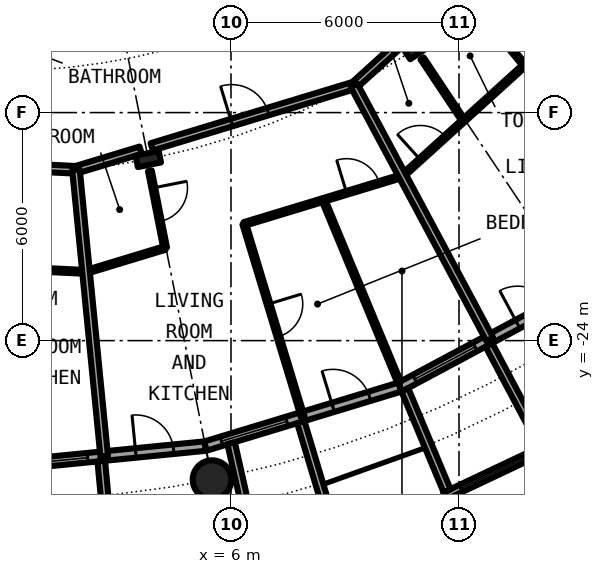
"""IFC4 building model, lengths in metres.
Left out: names, types, materials, properties, quantities, classifications, styles, units other than length and angle.
Written with IfcOpenShell. Run it as: python <this file> out.ifc"""

import sys

from ifc_helpers import new_model, si_unit, direction, frame, frame_2d, origin, origin_2d, place, context, subcontext, project, spatial, rectangle, circle, hollow_circle, i_section, extrude, element, fill, save


model = new_model("IFC4")
c1 = context("Model", 3, precision=1e-05, world=origin(), true_north=direction((0.0, 1.0)))
c2 = subcontext(c1, "Body", "Model", "MODEL_VIEW")
j1 = project(units=[si_unit("LENGTHUNIT", "METRE"), si_unit("PLANEANGLEUNIT", "RADIAN")], contexts=[c1])
p1 = place(None, origin())
s1 = spatial("IfcSite", under=j1, at=p1, CompositionType="ELEMENT")
p2 = place(p1, origin())
s2 = spatial("IfcBuilding", under=s1, at=p2, CompositionType="ELEMENT")
p3 = place(p2, frame((0.0, 0.0, 41.1)))
s3 = spatial("IfcBuildingStorey", under=s2, at=p3, CompositionType="ELEMENT", Elevation=41.1)
p4 = place(p3, frame((5.501, -27.658, 0.0), z_axis=(0.0, 0.0, 1.0), x_axis=(1.0, 0.0, 0.0)))
e1 = element("IfcColumn", 1, at=p4, inside=s3, PredefinedType="COLUMN", context=c2, shape_type="SweptSolid", body=[
    extrude(hollow_circle(Radius=0.508, WallThickness=0.05, at=origin_2d()), origin(), (0.0, 0.0, 1.0), 3.05),
])
for number, where, z_axis, x_axis in (
    (2, (3.824, -19.223, 0.0), (0.0, 0.0, 1.0), (0.195, -0.981, 0.0)),
    (3, (10.889, -16.297, 0.0), (0.0, 0.0, 1.0), (0.556, -0.831, 0.0)),
):
    element("IfcColumn", number, at=place(p3, frame(where, z_axis=z_axis, x_axis=x_axis)), inside=s3, PredefinedType="COLUMN", context=c2, shape_type="SweptSolid", body=[
        extrude(i_section(OverallWidth=0.305, OverallDepth=0.62, WebThickness=0.021, FlangeThickness=0.04, FilletRadius=0.027, at=origin_2d()), origin(), (0.0, 0.0, 1.0), 3.05),
    ])
p5 = place(p3, frame((0.0, -27.3, 0.0), z_axis=(0.0, 0.0, 1.0), x_axis=(0.995173996315, 0.098126026407, 0.0)))
e4 = element("IfcWall", 4, at=p5, inside=s3, PredefinedType="SOLIDWALL", context=c2, shape_type="SweptSolid", body=[
    extrude(rectangle(XDim=5.352, YDim=0.25, at=frame_2d((2.676, 0.0))), origin(), (0.0, 0.0, 1.0), 2.7),
])
p6 = place(p5, frame((0.441, 0.0, 0.3)))
e5 = element("IfcOpeningElement", 5, at=p6, cuts=e4, PredefinedType="OPENING", context=c2, shape_type="SweptSolid", body=[
    extrude(rectangle(XDim=1.8, YDim=2.1, at=frame_2d((0.9, 1.05))), frame((0.0, 0.135, 0.0), z_axis=(0.0, -1.0, 0.0), x_axis=(1.0, 0.0, 0.0)), (0.0, 0.0, 1.0), 0.27),
])
p7 = place(p5, frame((3.51, 0.0, 0.0)))
e6 = element("IfcOpeningElement", 6, at=p7, cuts=e4, PredefinedType="OPENING", context=c2, shape_type="SweptSolid", body=[
    extrude(rectangle(XDim=1.0, YDim=2.2, at=frame_2d((0.5, 1.1))), frame((0.0, 0.135, 0.0), z_axis=(0.0, -1.0, 0.0), x_axis=(1.0, 0.0, 0.0)), (0.0, 0.0, 1.0), 0.27),
])
p8 = place(p3, frame((2.586, -27.171, -0.03), z_axis=(0.0, 0.0, 1.0), x_axis=(0.094548432284, -0.995520262954, 0.0)))
e7 = element("IfcWall", 7, at=p8, inside=s3, PredefinedType="SOLIDWALL", context=c2, shape_type="SweptSolid", body=[
    extrude(rectangle(XDim=3.006, YDim=0.2, at=frame_2d((1.503, 0.0))), origin(), (0.0, 0.0, 1.0), 2.73),
])
p9 = place(p3, frame((5.326, -26.775, 0.0), z_axis=(0.0, 0.0, 1.0), x_axis=(0.956965678721, 0.290201119486, 0.0)))
e8 = element("IfcWall", 8, at=p9, inside=s3, PredefinedType="SOLIDWALL", context=c2, shape_type="SweptSolid", body=[
    extrude(rectangle(XDim=5.351, YDim=0.25, at=frame_2d((2.676, 0.0))), origin(), (0.0, 0.0, 1.0), 2.7),
])
p10 = place(p9, frame((0.441, 0.0, 0.3)))
e9 = element("IfcOpeningElement", 9, at=p10, cuts=e8, PredefinedType="OPENING", context=c2, shape_type="SweptSolid", body=[
    extrude(rectangle(XDim=1.8, YDim=2.1, at=frame_2d((0.9, 1.05))), frame((0.0, 0.135, 0.0), z_axis=(0.0, -1.0, 0.0), x_axis=(1.0, 0.0, 0.0)), (0.0, 0.0, 1.0), 0.27),
])
p11 = place(p9, frame((3.51, 0.0, 0.0)))
e10 = element("IfcOpeningElement", 10, at=p11, cuts=e8, PredefinedType="OPENING", context=c2, shape_type="SweptSolid", body=[
    extrude(rectangle(XDim=1.0, YDim=2.2, at=frame_2d((0.5, 1.1))), frame((0.0, 0.135, 0.0), z_axis=(0.0, -1.0, 0.0), x_axis=(1.0, 0.0, 0.0)), (0.0, 0.0, 1.0), 0.27),
])
p12 = place(p3, frame((6.004, -26.7, -0.03), z_axis=(0.0, 0.0, 1.0), x_axis=(0.219609259383, -0.975587911566, 0.0)))
e11 = element("IfcWall", 11, at=p12, inside=s3, PredefinedType="SOLIDWALL", context=c2, shape_type="SweptSolid", body=[
    extrude(rectangle(XDim=2.933, YDim=0.2, at=frame_2d((1.466, 0.0))), origin(), (0.0, 0.0, 1.0), 2.73),
])
p13 = place(p3, frame((7.837, -26.144, -0.03), z_axis=(0.0, 0.0, 1.0), x_axis=(0.287064767992, -0.957911174889, 0.0)))
e12 = element("IfcWall", 12, at=p13, inside=s3, PredefinedType="SOLIDWALL", context=c2, shape_type="SweptSolid", body=[
    extrude(rectangle(XDim=3.006, YDim=0.2, at=frame_2d((1.503, 0.0))), origin(), (0.0, 0.0, 1.0), 2.73),
])
p14 = place(p3, frame((10.447, -25.222, 0.0), z_axis=(0.0, 0.0, 1.0), x_axis=(0.881915646801, 0.471407246368, 0.0)))
e13 = element("IfcWall", 13, at=p14, inside=s3, PredefinedType="SOLIDWALL", context=c2, shape_type="SweptSolid", body=[
    extrude(rectangle(XDim=5.352, YDim=0.25, at=frame_2d((2.676, 0.0))), origin(), (0.0, 0.0, 1.0), 2.7),
])
p15 = place(p14, frame((0.441, 0.0, 0.3)))
e14 = element("IfcOpeningElement", 14, at=p15, cuts=e13, PredefinedType="OPENING", context=c2, shape_type="SweptSolid", body=[
    extrude(rectangle(XDim=1.8, YDim=2.1, at=frame_2d((0.9, 1.05))), frame((0.0, 0.135, 0.0), z_axis=(0.0, -1.0, 0.0), x_axis=(1.0, 0.0, 0.0)), (0.0, 0.0, 1.0), 0.27),
])
p16 = place(p14, frame((3.51, 0.0, 0.0)))
e15 = element("IfcOpeningElement", 15, at=p16, cuts=e13, PredefinedType="OPENING", context=c2, shape_type="SweptSolid", body=[
    extrude(rectangle(XDim=1.0, YDim=2.2, at=frame_2d((0.5, 1.1))), frame((0.0, 0.135, 0.0), z_axis=(0.0, -1.0, 0.0), x_axis=(1.0, 0.0, 0.0)), (0.0, 0.0, 1.0), 0.27),
])
p17 = place(p3, frame((11.629, -28.088, -0.03), z_axis=(0.0, 0.0, 1.0), x_axis=(0.904000060331, 0.427532327342, 0.0)))
e16 = element("IfcWall", 16, at=p17, inside=s3, PredefinedType="SOLIDWALL", context=c2, shape_type="SweptSolid", body=[
    extrude(rectangle(XDim=2.993, YDim=0.2, at=frame_2d((1.497, 0.0))), origin(), (0.0, 0.0, 1.0), 2.73),
])
p18 = place(p17, frame((0.457, 0.0, 0.33)))
e17 = element("IfcOpeningElement", 17, at=p18, cuts=e16, PredefinedType="OPENING", context=c2, shape_type="SweptSolid", body=[
    extrude(circle(Radius=1.04, at=frame_2d((1.04, 1.04))), frame((0.0, 0.11, 0.0), z_axis=(0.0, -1.0, 0.0), x_axis=(1.0, 0.0, 0.0)), (0.0, 0.0, 1.0), 0.22),
])
p19 = place(p3, frame((10.575, -25.295, -0.03), z_axis=(0.0, 0.0, 1.0), x_axis=(0.385697364644, -0.922625353492, 0.0)))
e18 = element("IfcWall", 18, at=p19, inside=s3, PredefinedType="SOLIDWALL", context=c2, shape_type="SweptSolid", body=[
    extrude(rectangle(XDim=2.883, YDim=0.2, at=frame_2d((1.442, 0.0))), origin(), (0.0, 0.0, 1.0), 2.73),
])
p20 = place(p3, frame((12.787, -24.113, -0.03), z_axis=(0.0, 0.0, 1.0), x_axis=(0.468365282436, -0.883534924159, 0.0)))
e19 = element("IfcWall", 19, at=p20, inside=s3, PredefinedType="SOLIDWALL", context=c2, shape_type="SweptSolid", body=[
    extrude(rectangle(XDim=3.006, YDim=0.2, at=frame_2d((1.503, 0.0))), origin(), (0.0, 0.0, 1.0), 2.73),
])
p21 = place(p3, frame((0.007, -22.086, 0.0), z_axis=(0.0, 0.0, 1.0), x_axis=(0.998792477005, -0.049128279821, 0.0)))
e20 = element("IfcWall", 20, at=p21, inside=s3, PredefinedType="PARTITIONING", context=c2, shape_type="SweptSolid", body=[
    extrude(rectangle(XDim=2.182, YDim=0.1, at=frame_2d((1.091, 0.0))), origin(), (0.0, 0.0, 1.0), 2.7),
])
p22 = place(p3, frame((2.18, -22.195, 0.0), z_axis=(0.0, 0.0, 1.0), x_axis=(0.956838221976, 0.290621088303, 0.0)))
e21 = element("IfcWall", 21, at=p22, inside=s3, PredefinedType="PARTITIONING", context=c2, shape_type="SweptSolid", body=[
    extrude(rectangle(XDim=2.175, YDim=0.1, at=frame_2d((1.087, 0.0))), origin(), (0.0, 0.0, 1.0), 2.7),
])
p23 = place(p3, frame((6.346, -20.931, 0.0), z_axis=(0.0, 0.0, 1.0), x_axis=(0.956923957423, 0.290338663821, 0.0)))
e22 = element("IfcWall", 22, at=p23, inside=s3, PredefinedType="PARTITIONING", context=c2, shape_type="SweptSolid", body=[
    extrude(rectangle(XDim=4.357, YDim=0.1, at=frame_2d((2.178, 0.0))), origin(), (0.0, 0.0, 1.0), 2.7),
])
p24 = place(p23, frame((2.818, 0.0, 0.0)))
e23 = element("IfcOpeningElement", 23, at=p24, cuts=e22, PredefinedType="OPENING", context=c2, shape_type="SweptSolid", body=[
    extrude(rectangle(XDim=0.9, YDim=2.3, at=frame_2d((0.45, 1.15))), frame((0.0, 0.06, 0.0), z_axis=(0.0, -1.0, 0.0), x_axis=(1.0, 0.0, 0.0)), (0.0, 0.0, 1.0), 0.12),
])
p25 = place(p3, frame((10.506, -19.671, 0.0), z_axis=(0.0, 0.0, 1.0), x_axis=(0.741162670015, 0.671325477377, 0.0)))
e24 = element("IfcWall", 24, at=p25, inside=s3, PredefinedType="PARTITIONING", context=c2, shape_type="SweptSolid", body=[
    extrude(rectangle(XDim=4.342, YDim=0.1, at=frame_2d((2.171, 0.0))), origin(), (0.0, 0.0, 1.0), 2.7),
])
p26 = place(p25, frame((0.643, 0.0, 0.0)))
e25 = element("IfcOpeningElement", 25, at=p26, cuts=e24, PredefinedType="OPENING", context=c2, shape_type="SweptSolid", body=[
    extrude(rectangle(XDim=0.9, YDim=2.3, at=frame_2d((0.45, 1.15))), frame((0.0, 0.06, 0.0), z_axis=(0.0, -1.0, 0.0), x_axis=(1.0, 0.0, 0.0)), (0.0, 0.0, 1.0), 0.12),
])
p27 = place(p3, frame((-3.67, -19.231, 0.0), z_axis=(0.0, 0.0, 1.0), x_axis=(0.99879118777, -0.049154483346, 0.0)))
e26 = element("IfcWall", 26, at=p27, inside=s3, PredefinedType="PARTITIONING", context=c2, shape_type="SweptSolid", body=[
    extrude(rectangle(XDim=5.598, YDim=0.2, at=frame_2d((2.799, 0.0))), origin(), (0.0, 0.0, 1.0), 2.38),
])
p28 = place(p27, frame((1.264, 0.0, 0.0)))
e27 = element("IfcOpeningElement", 27, at=p28, cuts=e26, PredefinedType="OPENING", context=c2, shape_type="SweptSolid", body=[
    extrude(rectangle(XDim=1.0, YDim=2.3, at=frame_2d((0.5, 1.15))), frame((0.0, 0.11, 0.0), z_axis=(0.0, -1.0, 0.0), x_axis=(1.0, 0.0, 0.0)), (0.0, 0.0, 1.0), 0.22),
])
p29 = place(p3, frame((1.921, -19.506, 0.0), z_axis=(0.0, 0.0, 1.0), x_axis=(0.956929641646, 0.290319928594, 0.0)))
e28 = element("IfcWall", 28, at=p29, inside=s3, PredefinedType="PARTITIONING", context=c2, shape_type="SweptSolid", body=[
    extrude(rectangle(XDim=1.778, YDim=0.2, at=frame_2d((0.889, 0.0))), origin(), (0.0, 0.0, 1.0), 2.38),
])
p30 = place(p3, frame((3.915, -18.901, 0.0), z_axis=(0.0, 0.0, 1.0), x_axis=(0.956941324682, 0.290281417103, 0.0)))
e29 = element("IfcWall", 29, at=p30, inside=s3, PredefinedType="PARTITIONING", context=c2, shape_type="SweptSolid", body=[
    extrude(rectangle(XDim=5.563, YDim=0.2, at=frame_2d((2.782, 0.0))), origin(), (0.0, 0.0, 1.0), 2.38),
])
p31 = place(p30, frame((2.196, 0.0, 0.0)))
e30 = element("IfcOpeningElement", 30, at=p31, cuts=e29, PredefinedType="OPENING", context=c2, shape_type="SweptSolid", body=[
    extrude(rectangle(XDim=1.0, YDim=2.3, at=frame_2d((0.5, 1.15))), frame((0.0, 0.11, 0.0), z_axis=(0.0, -1.0, 0.0), x_axis=(1.0, 0.0, 0.0)), (0.0, 0.0, 1.0), 0.22),
])
p32 = place(p3, frame((9.239, -17.287, 0.0), z_axis=(0.0, 0.0, 1.0), x_axis=(0.74089212117, 0.671624050186, 0.0)))
e31 = element("IfcWall", 31, at=p32, inside=s3, PredefinedType="PARTITIONING", context=c2, shape_type="SweptSolid", body=[
    extrude(rectangle(XDim=9.368, YDim=0.2, at=frame_2d((4.684, 0.0))), origin(), (0.0, 0.0, 1.0), 2.38),
])
p33 = place(p32, frame((4.263, 0.0, 0.0)))
e32 = element("IfcOpeningElement", 32, at=p33, cuts=e31, PredefinedType="OPENING", context=c2, shape_type="SweptSolid", body=[
    extrude(rectangle(XDim=1.0, YDim=2.3, at=frame_2d((0.5, 1.15))), frame((0.0, 0.11, 0.0), z_axis=(0.0, -1.0, 0.0), x_axis=(1.0, 0.0, 0.0)), (0.0, 0.0, 1.0), 0.22),
])
p34 = place(p3, frame((1.921, -19.506, 0.0), z_axis=(0.0, 0.0, 1.0), x_axis=(0.098115395479, -0.995175044487, 0.0)))
e33 = element("IfcWall", 33, at=p34, inside=s3, PredefinedType="PARTITIONING", context=c2, shape_type="SweptSolid", body=[
    extrude(rectangle(XDim=7.574, YDim=0.2, at=frame_2d((3.787, 0.0))), origin(), (0.0, 0.0, 1.0), 2.7),
])
p35 = place(p3, frame((3.866, -19.531, 0.0), z_axis=(0.0, 0.0, 1.0), x_axis=(0.193846698927, -0.981031832977, 0.0)))
e34 = element("IfcWall", 34, at=p35, inside=s3, PredefinedType="PARTITIONING", context=c2, shape_type="SweptSolid", body=[
    extrude(rectangle(XDim=2.069, YDim=0.1, at=frame_2d((1.035, 0.0))), origin(), (0.0, 0.0, 1.0), 2.7),
])
p36 = place(p35, frame((0.459, 0.0, 0.0)))
e35 = element("IfcOpeningElement", 35, at=p36, cuts=e34, PredefinedType="OPENING", context=c2, shape_type="SweptSolid", body=[
    extrude(rectangle(XDim=0.9, YDim=2.3, at=frame_2d((0.45, 1.15))), frame((0.0, 0.06, 0.0), z_axis=(0.0, -1.0, 0.0), x_axis=(1.0, 0.0, 0.0)), (0.0, 0.0, 1.0), 0.12),
])
p37 = place(p3, frame((6.349, -20.93, 0.0), z_axis=(0.0, 0.0, 1.0), x_axis=(0.290172218727, -0.956974442438, 0.0)))
e36 = element("IfcWall", 36, at=p37, inside=s3, PredefinedType="PARTITIONING", context=c2, shape_type="SweptSolid", body=[
    extrude(rectangle(XDim=5.303, YDim=0.1, at=frame_2d((2.652, 0.0))), origin(), (0.0, 0.0, 1.0), 2.7),
])
p38 = place(p37, frame((2.202, 0.0, 0.0)))
e37 = element("IfcOpeningElement", 37, at=p38, cuts=e36, PredefinedType="OPENING", context=c2, shape_type="SweptSolid", body=[
    extrude(rectangle(XDim=0.9, YDim=2.3, at=frame_2d((0.45, 1.15))), frame((0.0, 0.06, 0.0), z_axis=(0.0, -1.0, 0.0), x_axis=(1.0, 0.0, 0.0)), (0.0, 0.0, 1.0), 0.12),
])
p39 = place(p3, frame((8.431, -20.298, 0.0), z_axis=(0.0, 0.0, 1.0), x_axis=(0.383640855682, -0.92348237333, 0.0)))
e38 = element("IfcWall", 38, at=p39, inside=s3, PredefinedType="PARTITIONING", context=c2, shape_type="SweptSolid", body=[
    extrude(rectangle(XDim=5.195, YDim=0.1, at=frame_2d((2.598, 0.0))), origin(), (0.0, 0.0, 1.0), 2.7),
])
p40 = place(p3, frame((9.239, -17.286, 0.0), z_axis=(0.0, 0.0, 1.0), x_axis=(0.471439510802, -0.881898399848, 0.0)))
e39 = element("IfcWall", 39, at=p40, inside=s3, PredefinedType="PARTITIONING", context=c2, shape_type="SweptSolid", body=[
    extrude(rectangle(XDim=7.575, YDim=0.2, at=frame_2d((3.787, 0.0))), origin(), (0.0, 0.0, 1.0), 2.7),
])
p41 = place(p3, frame((11.03, -16.576, 0.0), z_axis=(0.0, 0.0, 1.0), x_axis=(0.553954074672, -0.83254722578, 0.0)))
e40 = element("IfcWall", 40, at=p41, inside=s3, PredefinedType="PARTITIONING", context=c2, shape_type="SweptSolid", body=[
    extrude(rectangle(XDim=1.964, YDim=0.1, at=frame_2d((0.982, 0.0))), origin(), (0.0, 0.0, 1.0), 2.7),
])
p42 = place(p3, frame((12.062, -14.727, 0.0), z_axis=(0.0, 0.0, 1.0), x_axis=(0.633688798249, -0.773588073185, 0.0)))
e41 = element("IfcWall", 41, at=p42, inside=s3, PredefinedType="PARTITIONING", context=c2, shape_type="SweptSolid", body=[
    extrude(rectangle(XDim=2.623, YDim=0.1, at=frame_2d((1.312, 0.0))), origin(), (0.0, 0.0, 1.0), 2.7),
])
p43 = place(p42, frame((0.861, 0.0, 0.0)))
e42 = element("IfcOpeningElement", 42, at=p43, cuts=e41, PredefinedType="OPENING", context=c2, shape_type="SweptSolid", body=[
    extrude(rectangle(XDim=0.9, YDim=2.3, at=frame_2d((0.45, 1.15))), frame((0.0, 0.06, 0.0), z_axis=(0.0, -1.0, 0.0), x_axis=(1.0, 0.0, 0.0)), (0.0, 0.0, 1.0), 0.12),
])
p44 = place(p3, frame((13.474, -13.448, 0.0), z_axis=(0.0, 0.0, 1.0), x_axis=(0.707901324545, -0.706311344031, 0.0)))
e43 = element("IfcWall", 43, at=p44, inside=s3, PredefinedType="PARTITIONING", context=c2, shape_type="SweptSolid", body=[
    extrude(rectangle(XDim=8.138, YDim=0.1, at=frame_2d((4.069, 0.0))), origin(), (0.0, 0.0, 1.0), 2.7),
])
p45 = place(p44, frame((0.861, 0.0, 0.0)))
e44 = element("IfcOpeningElement", 44, at=p45, cuts=e43, PredefinedType="OPENING", context=c2, shape_type="SweptSolid", body=[
    extrude(rectangle(XDim=0.9, YDim=2.3, at=frame_2d((0.45, 1.15))), frame((0.0, 0.06, 0.0), z_axis=(0.0, -1.0, 0.0), x_axis=(1.0, 0.0, 0.0)), (0.0, 0.0, 1.0), 0.12),
])
p46 = place(p44, frame((4.931, 0.0, 0.0)))
e45 = element("IfcOpeningElement", 45, at=p46, cuts=e43, PredefinedType="OPENING", context=c2, shape_type="SweptSolid", body=[
    extrude(rectangle(XDim=0.9, YDim=2.3, at=frame_2d((0.45, 1.15))), frame((0.0, 0.06, 0.0), z_axis=(0.0, -1.0, 0.0), x_axis=(1.0, 0.0, 0.0)), (0.0, 0.0, 1.0), 0.12),
])
p47 = place(p6, origin())
e46 = element("IfcWindow", 46, at=p47, inside=s3, PartitioningType="SINGLE_PANEL", PredefinedType="WINDOW", context=c2, shape_type="SweptSolid", body=[
    extrude(rectangle(XDim=1.8, YDim=2.1, at=frame_2d((0.9, 1.05))), frame((0.0, 0.03, 0.0), z_axis=(0.0, -1.0, 0.0), x_axis=(1.0, 0.0, 0.0)), (0.0, 0.0, 1.0), 0.06),
])
fill(e5, e46)
p48 = place(p7, origin())
e47 = element("IfcDoor", 47, at=p48, inside=s3, OperationType="SINGLE_SWING_LEFT", PredefinedType="DOOR", context=c2, shape_type="SweptSolid", body=[
    extrude(rectangle(XDim=1.0, YDim=2.2, at=frame_2d((0.5, 1.1))), frame((0.0, 0.025, 0.0), z_axis=(0.0, -1.0, 0.0), x_axis=(1.0, 0.0, 0.0)), (0.0, 0.0, 1.0), 0.05),
])
fill(e6, e47)
p49 = place(p10, origin())
e48 = element("IfcWindow", 48, at=p49, inside=s3, PartitioningType="SINGLE_PANEL", PredefinedType="WINDOW", context=c2, shape_type="SweptSolid", body=[
    extrude(rectangle(XDim=1.8, YDim=2.1, at=frame_2d((0.9, 1.05))), frame((0.0, 0.03, 0.0), z_axis=(0.0, -1.0, 0.0), x_axis=(1.0, 0.0, 0.0)), (0.0, 0.0, 1.0), 0.06),
])
fill(e9, e48)
p50 = place(p11, origin())
e49 = element("IfcDoor", 49, at=p50, inside=s3, OperationType="SINGLE_SWING_LEFT", PredefinedType="DOOR", context=c2, shape_type="SweptSolid", body=[
    extrude(rectangle(XDim=1.0, YDim=2.2, at=frame_2d((0.5, 1.1))), frame((0.0, 0.025, 0.0), z_axis=(0.0, -1.0, 0.0), x_axis=(1.0, 0.0, 0.0)), (0.0, 0.0, 1.0), 0.05),
])
fill(e10, e49)
p51 = place(p15, origin())
e50 = element("IfcWindow", 50, at=p51, inside=s3, PartitioningType="SINGLE_PANEL", PredefinedType="WINDOW", context=c2, shape_type="SweptSolid", body=[
    extrude(rectangle(XDim=1.8, YDim=2.1, at=frame_2d((0.9, 1.05))), frame((0.0, 0.03, 0.0), z_axis=(0.0, -1.0, 0.0), x_axis=(1.0, 0.0, 0.0)), (0.0, 0.0, 1.0), 0.06),
])
fill(e14, e50)
p52 = place(p18, origin())
e51 = element("IfcWindow", 51, at=p52, inside=s3, PartitioningType="SINGLE_PANEL", PredefinedType="WINDOW", context=c2, shape_type="SweptSolid", body=[
    extrude(circle(Radius=1.04, at=frame_2d((1.04, 1.04))), frame((0.0, 0.03, 0.0), z_axis=(0.0, -1.0, 0.0), x_axis=(1.0, 0.0, 0.0)), (0.0, 0.0, 1.0), 0.06),
])
fill(e17, e51)
p53 = place(p16, origin())
e52 = element("IfcDoor", 52, at=p53, inside=s3, OperationType="SINGLE_SWING_LEFT", PredefinedType="DOOR", context=c2, shape_type="SweptSolid", body=[
    extrude(rectangle(XDim=1.0, YDim=2.2, at=frame_2d((0.5, 1.1))), frame((0.0, 0.025, 0.0), z_axis=(0.0, -1.0, 0.0), x_axis=(1.0, 0.0, 0.0)), (0.0, 0.0, 1.0), 0.05),
])
fill(e15, e52)
p54 = place(p31, origin())
e53 = element("IfcDoor", 53, at=p54, inside=s3, OperationType="SINGLE_SWING_LEFT", PredefinedType="DOOR", context=c2, shape_type="SweptSolid", body=[
    extrude(rectangle(XDim=1.0, YDim=2.3, at=frame_2d((0.5, 1.15))), frame((0.0, 0.025, 0.0), z_axis=(0.0, -1.0, 0.0), x_axis=(1.0, 0.0, 0.0)), (0.0, 0.0, 1.0), 0.05),
])
fill(e30, e53)
p55 = place(p36, origin())
e54 = element("IfcDoor", 54, at=p55, inside=s3, OperationType="SINGLE_SWING_LEFT", PredefinedType="DOOR", context=c2, shape_type="SweptSolid", body=[
    extrude(rectangle(XDim=0.9, YDim=2.3, at=frame_2d((0.45, 1.15))), frame((0.0, 0.025, 0.0), z_axis=(0.0, -1.0, 0.0), x_axis=(1.0, 0.0, 0.0)), (0.0, 0.0, 1.0), 0.05),
])
fill(e35, e54)
p56 = place(p38, origin())
e55 = element("IfcDoor", 55, at=p56, inside=s3, OperationType="SINGLE_SWING_RIGHT", PredefinedType="DOOR", context=c2, shape_type="SweptSolid", body=[
    extrude(rectangle(XDim=0.9, YDim=2.3, at=frame_2d((0.45, 1.15))), frame((0.0, 0.025, 0.0), z_axis=(0.0, -1.0, 0.0), x_axis=(1.0, 0.0, 0.0)), (0.0, 0.0, 1.0), 0.05),
])
fill(e37, e55)
p57 = place(p24, origin())
e56 = element("IfcDoor", 56, at=p57, inside=s3, OperationType="SINGLE_SWING_RIGHT", PredefinedType="DOOR", context=c2, shape_type="SweptSolid", body=[
    extrude(rectangle(XDim=0.9, YDim=2.3, at=frame_2d((0.45, 1.15))), frame((0.0, 0.025, 0.0), z_axis=(0.0, -1.0, 0.0), x_axis=(1.0, 0.0, 0.0)), (0.0, 0.0, 1.0), 0.05),
])
fill(e23, e56)
p58 = place(p26, origin())
e57 = element("IfcDoor", 57, at=p58, inside=s3, OperationType="SINGLE_SWING_LEFT", PredefinedType="DOOR", context=c2, shape_type="SweptSolid", body=[
    extrude(rectangle(XDim=0.9, YDim=2.3, at=frame_2d((0.45, 1.15))), frame((0.0, 0.025, 0.0), z_axis=(0.0, -1.0, 0.0), x_axis=(1.0, 0.0, 0.0)), (0.0, 0.0, 1.0), 0.05),
])
fill(e25, e57)
save(model, sys.argv[1])
